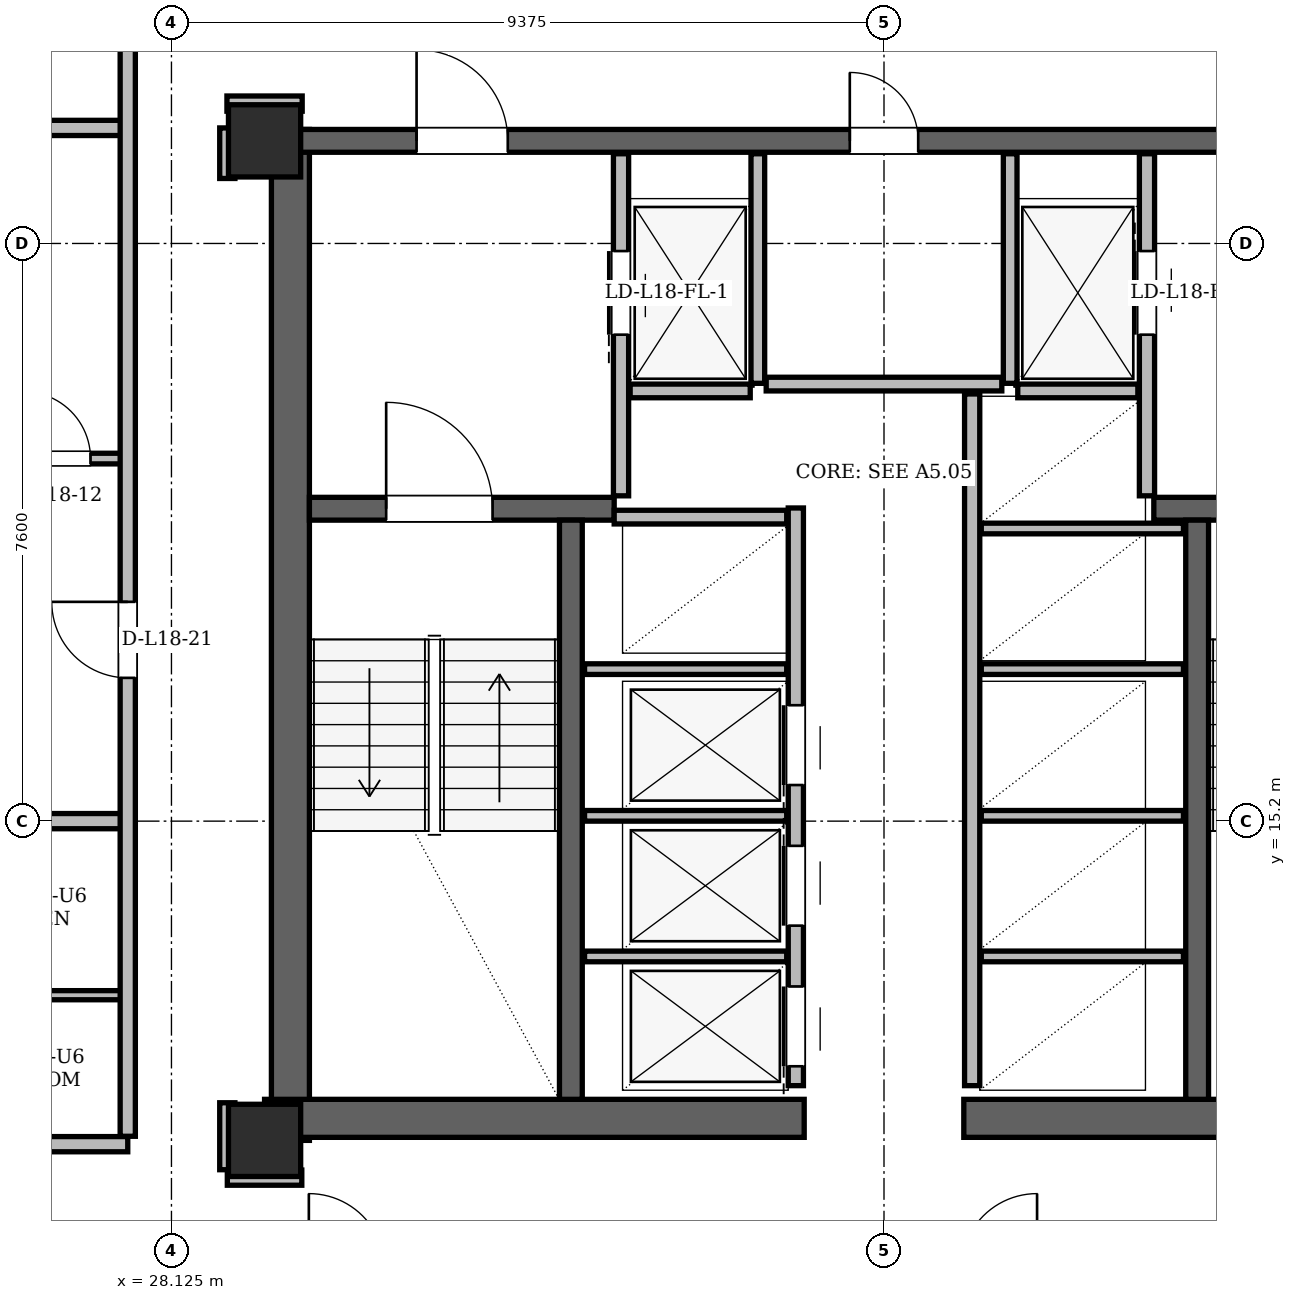
"""IFC4 building model, lengths in metres.
Left out: names, types, materials, properties, quantities, classifications, styles, units other than length and angle.
Written with IfcOpenShell. Run it as: python <this file> out.ifc"""

import sys

from ifc_helpers import new_model, si_unit, direction, frame, frame_2d, origin, origin_2d, place, context, subcontext, project, spatial, rectangle, hollow_rectangle, extrude, element, fill, save


model = new_model("IFC4")
c1 = context("Model", 3, precision=1e-05, world=origin(), true_north=direction((0.0, 1.0)))
c2 = subcontext(c1, "Body", "Model", "MODEL_VIEW")
j1 = project(units=[si_unit("LENGTHUNIT", "METRE"), si_unit("PLANEANGLEUNIT", "RADIAN")], contexts=[c1])
p1 = place(None, origin())
s1 = spatial("IfcSite", under=j1, at=p1, CompositionType="ELEMENT")
p2 = place(p1, origin())
s2 = spatial("IfcBuilding", under=s1, at=p2, CompositionType="ELEMENT")
p3 = place(p2, frame((0.0, 0.0, 70.5)))
s3 = spatial("IfcBuildingStorey", under=s2, at=p3, CompositionType="ELEMENT", Elevation=70.5)
for number, where, z_axis, x_axis in (
    (1, (29.35, 11.0, 0.0), (0.0, 0.0, 1.0), (1.0, 0.0, 0.0)),
    (2, (29.35, 24.15, 0.0), (0.0, 0.0, 1.0), (1.0, 0.0, 0.0)),
):
    element("IfcColumn", number, at=place(p3, frame(where, z_axis=z_axis, x_axis=x_axis)), inside=s3, PredefinedType="COLUMN", context=c2, shape_type="SweptSolid", body=[
        extrude(hollow_rectangle(XDim=0.95, YDim=0.95, WallThickness=0.08, at=origin_2d()), origin(), (0.0, 0.0, 1.0), 3.6),
    ])
p4 = place(p3, frame((29.69, 11.0, 0.0), z_axis=(0.0, 0.0, 1.0), x_axis=(0.0, 1.0, 0.0)))
e3 = element("IfcWall", 3, at=p4, inside=s3, PredefinedType="SHEAR", context=c2, shape_type="SweptSolid", body=[
    extrude(rectangle(XDim=13.3, YDim=0.5, at=frame_2d((6.65, 0.0))), origin(), (0.0, 0.0, 1.0), 3.36),
])
for number, where, z_axis, x_axis in (
    (4, (29.35, 11.29, 0.0), (0.0, 0.0, 1.0), (1.0, 0.0, 0.0)),
    (5, (38.55, 11.29, 0.0), (0.0, 0.0, 1.0), (1.0, 0.0, 0.0)),
):
    element("IfcWall", number, at=place(p3, frame(where, z_axis=z_axis, x_axis=x_axis)), inside=s3, PredefinedType="SHEAR", context=c2, shape_type="SweptSolid", body=[
        extrude(rectangle(XDim=7.1, YDim=0.5, at=frame_2d((3.55, 0.0))), origin(), (0.0, 0.0, 1.0), 3.36),
    ])
p5 = place(p3, frame((29.65, 24.15, 0.0), z_axis=(0.0, 0.0, 1.0), x_axis=(1.0, 0.0, 0.0)))
e6 = element("IfcWall", 6, at=p5, inside=s3, PredefinedType="SHEAR", context=c2, shape_type="SweptSolid", body=[
    extrude(rectangle(XDim=15.7, YDim=0.3, at=frame_2d((7.85, 0.0))), origin(), (0.0, 0.0, 1.0), 3.36),
])
p6 = place(p5, frame((1.7, 0.0, 0.0)))
e7 = element("IfcOpeningElement", 7, at=p6, cuts=e6, PredefinedType="OPENING", context=c2, shape_type="SweptSolid", body=[
    extrude(rectangle(XDim=1.2, YDim=2.2, at=frame_2d((0.6, 1.1))), frame((0.0, 0.15, 0.0), z_axis=(0.0, -1.0, 0.0), x_axis=(1.0, 0.0, 0.0)), (0.0, 0.0, 1.0), 0.3),
])
p7 = place(p5, frame((12.8, 0.0, 0.0)))
e8 = element("IfcOpeningElement", 8, at=p7, cuts=e6, PredefinedType="OPENING", context=c2, shape_type="SweptSolid", body=[
    extrude(rectangle(XDim=1.2, YDim=2.2, at=frame_2d((0.6, 1.1))), frame((0.0, 0.15, 0.0), z_axis=(0.0, -1.0, 0.0), x_axis=(1.0, 0.0, 0.0)), (0.0, 0.0, 1.0), 0.3),
])
p8 = place(p5, frame((7.4, 0.0, 0.0)))
e9 = element("IfcOpeningElement", 9, at=p8, cuts=e6, PredefinedType="OPENING", context=c2, shape_type="SweptSolid", body=[
    extrude(rectangle(XDim=0.9, YDim=2.05, at=frame_2d((0.45, 1.025))), frame((0.0, 0.15, 0.0), z_axis=(0.0, -1.0, 0.0), x_axis=(1.0, 0.0, 0.0)), (0.0, 0.0, 1.0), 0.3),
])
p9 = place(p3, frame((29.94, 19.31, 0.0), z_axis=(0.0, 0.0, 1.0), x_axis=(1.0, 0.0, 0.0)))
e10 = element("IfcWall", 10, at=p9, inside=s3, PredefinedType="SHEAR", context=c2, shape_type="SweptSolid", body=[
    extrude(rectangle(XDim=4.01, YDim=0.3, at=frame_2d((2.005, 0.0))), origin(), (0.0, 0.0, 1.0), 3.36),
])
p10 = place(p9, frame((1.01, 0.0, 0.0)))
e11 = element("IfcOpeningElement", 11, at=p10, cuts=e10, PredefinedType="OPENING", context=c2, shape_type="SweptSolid", body=[
    extrude(rectangle(XDim=1.4, YDim=2.2, at=frame_2d((0.7, 1.1))), frame((0.0, 0.15, 0.0), z_axis=(0.0, -1.0, 0.0), x_axis=(1.0, 0.0, 0.0)), (0.0, 0.0, 1.0), 0.3),
])
p11 = place(p3, frame((41.05, 19.31, 0.0), z_axis=(0.0, 0.0, 1.0), x_axis=(1.0, 0.0, 0.0)))
e12 = element("IfcWall", 12, at=p11, inside=s3, PredefinedType="SHEAR", context=c2, shape_type="SweptSolid", body=[
    extrude(rectangle(XDim=4.01, YDim=0.3, at=frame_2d((2.005, 0.0))), origin(), (0.0, 0.0, 1.0), 3.36),
])
p12 = place(p11, frame((1.6, 0.0, 0.0)))
e13 = element("IfcOpeningElement", 13, at=p12, cuts=e12, PredefinedType="OPENING", context=c2, shape_type="SweptSolid", body=[
    extrude(rectangle(XDim=1.4, YDim=2.2, at=frame_2d((0.7, 1.1))), frame((0.0, 0.15, 0.0), z_axis=(0.0, -1.0, 0.0), x_axis=(1.0, 0.0, 0.0)), (0.0, 0.0, 1.0), 0.3),
])
for number, where, z_axis, x_axis in (
    (14, (33.38, 11.54, 0.0), (0.0, 0.0, 1.0), (0.0, 1.0, 0.0)),
    (15, (41.62, 11.54, 0.0), (0.0, 0.0, 1.0), (0.0, 1.0, 0.0)),
):
    element("IfcWall", number, at=place(p3, frame(where, z_axis=z_axis, x_axis=x_axis)), inside=s3, PredefinedType="SHEAR", context=c2, shape_type="SweptSolid", body=[
        extrude(rectangle(XDim=7.62, YDim=0.3, at=frame_2d((3.81, 0.0))), origin(), (0.0, 0.0, 1.0), 3.36),
    ])
p13 = place(p3, frame((34.04, 19.48, 0.0), z_axis=(0.0, 0.0, 1.0), x_axis=(0.0, 1.0, 0.0)))
e16 = element("IfcWall", 16, at=p13, inside=s3, PredefinedType="PARTITIONING", context=c2, shape_type="SweptSolid", body=[
    extrude(rectangle(XDim=4.5, YDim=0.2, at=frame_2d((2.25, 0.0))), origin(), (0.0, 0.0, 1.0), 2.4),
])
p14 = place(p13, frame((2.12, 0.0, 0.0)))
e17 = element("IfcOpeningElement", 17, at=p14, cuts=e16, PredefinedType="OPENING", context=c2, shape_type="SweptSolid", body=[
    extrude(rectangle(XDim=1.1, YDim=2.2, at=frame_2d((0.55, 1.1))), frame((0.0, 0.1, 0.0), z_axis=(0.0, -1.0, 0.0), x_axis=(1.0, 0.0, 0.0)), (0.0, 0.0, 1.0), 0.2),
])
p15 = place(p3, frame((35.84, 20.96, 0.0), z_axis=(0.0, 0.0, 1.0), x_axis=(0.0, 1.0, 0.0)))
e18 = element("IfcWall", 18, at=p15, inside=s3, PredefinedType="PARTITIONING", context=c2, shape_type="SweptSolid", body=[
    extrude(rectangle(XDim=3.02, YDim=0.18, at=frame_2d((1.51, 0.0))), origin(), (0.0, 0.0, 1.0), 2.4),
])
p16 = place(p3, frame((34.16, 20.86, 0.0), z_axis=(0.0, 0.0, 1.0), x_axis=(1.0, 0.0, 0.0)))
e19 = element("IfcWall", 19, at=p16, inside=s3, PredefinedType="PARTITIONING", context=c2, shape_type="SweptSolid", body=[
    extrude(rectangle(XDim=1.58, YDim=0.18, at=frame_2d((0.79, 0.0))), origin(), (0.0, 0.0, 1.0), 3.36),
])
p17 = place(p3, frame((40.96, 19.48, 0.0), z_axis=(0.0, 0.0, 1.0), x_axis=(0.0, 1.0, 0.0)))
e20 = element("IfcWall", 20, at=p17, inside=s3, PredefinedType="PARTITIONING", context=c2, shape_type="SweptSolid", body=[
    extrude(rectangle(XDim=4.5, YDim=0.2, at=frame_2d((2.25, 0.0))), origin(), (0.0, 0.0, 1.0), 2.4),
])
p18 = place(p17, frame((2.12, 0.0, 0.0)))
e21 = element("IfcOpeningElement", 21, at=p18, cuts=e20, PredefinedType="OPENING", context=c2, shape_type="SweptSolid", body=[
    extrude(rectangle(XDim=1.1, YDim=2.2, at=frame_2d((0.55, 1.1))), frame((0.0, 0.1, 0.0), z_axis=(0.0, -1.0, 0.0), x_axis=(1.0, 0.0, 0.0)), (0.0, 0.0, 1.0), 0.2),
])
p19 = place(p3, frame((39.16, 20.96, 0.0), z_axis=(0.0, 0.0, 1.0), x_axis=(0.0, 1.0, 0.0)))
e22 = element("IfcWall", 22, at=p19, inside=s3, PredefinedType="PARTITIONING", context=c2, shape_type="SweptSolid", body=[
    extrude(rectangle(XDim=3.02, YDim=0.18, at=frame_2d((1.51, 0.0))), origin(), (0.0, 0.0, 1.0), 2.4),
])
p20 = place(p3, frame((39.26, 20.86, 0.0), z_axis=(0.0, 0.0, 1.0), x_axis=(1.0, 0.0, 0.0)))
e23 = element("IfcWall", 23, at=p20, inside=s3, PredefinedType="PARTITIONING", context=c2, shape_type="SweptSolid", body=[
    extrude(rectangle(XDim=1.58, YDim=0.18, at=frame_2d((0.79, 0.0))), origin(), (0.0, 0.0, 1.0), 3.36),
])
p21 = place(p3, frame((36.34, 11.72, 0.0), z_axis=(0.0, 0.0, 1.0), x_axis=(0.0, 1.0, 0.0)))
e24 = element("IfcWall", 24, at=p21, inside=s3, PredefinedType="PARTITIONING", context=c2, shape_type="SweptSolid", body=[
    extrude(rectangle(XDim=7.6, YDim=0.2, at=frame_2d((3.8, 0.0))), origin(), (0.0, 0.0, 1.0), 3.36),
])
p22 = place(p21, frame((0.255, 0.0, 0.0)))
e25 = element("IfcOpeningElement", 25, at=p22, cuts=e24, PredefinedType="OPENING", context=c2, shape_type="SweptSolid", body=[
    extrude(rectangle(XDim=1.05, YDim=2.15, at=frame_2d((0.525, 1.075))), frame((0.0, 0.1, 0.0), z_axis=(0.0, -1.0, 0.0), x_axis=(1.0, 0.0, 0.0)), (0.0, 0.0, 1.0), 0.2),
])
p23 = place(p21, frame((2.105, 0.0, 0.0)))
e26 = element("IfcOpeningElement", 26, at=p23, cuts=e24, PredefinedType="OPENING", context=c2, shape_type="SweptSolid", body=[
    extrude(rectangle(XDim=1.05, YDim=2.15, at=frame_2d((0.525, 1.075))), frame((0.0, 0.1, 0.0), z_axis=(0.0, -1.0, 0.0), x_axis=(1.0, 0.0, 0.0)), (0.0, 0.0, 1.0), 0.2),
])
p24 = place(p21, frame((3.955, 0.0, 0.0)))
e27 = element("IfcOpeningElement", 27, at=p24, cuts=e24, PredefinedType="OPENING", context=c2, shape_type="SweptSolid", body=[
    extrude(rectangle(XDim=1.05, YDim=2.15, at=frame_2d((0.525, 1.075))), frame((0.0, 0.1, 0.0), z_axis=(0.0, -1.0, 0.0), x_axis=(1.0, 0.0, 0.0)), (0.0, 0.0, 1.0), 0.2),
])
p25 = place(p3, frame((33.95, 19.2, 0.0), z_axis=(0.0, 0.0, 1.0), x_axis=(1.0, 0.0, 0.0)))
e28 = element("IfcWall", 28, at=p25, inside=s3, PredefinedType="PARTITIONING", context=c2, shape_type="SweptSolid", body=[
    extrude(rectangle(XDim=2.27, YDim=0.18, at=frame_2d((1.135, 0.0))), origin(), (0.0, 0.0, 1.0), 3.36),
])
for number, where, z_axis, x_axis in (
    (29, (33.56, 13.42, 0.0), (0.0, 0.0, 1.0), (1.0, 0.0, 0.0)),
    (30, (33.56, 15.27, 0.0), (0.0, 0.0, 1.0), (1.0, 0.0, 0.0)),
    (31, (33.56, 17.2, 0.0), (0.0, 0.0, 1.0), (1.0, 0.0, 0.0)),
):
    element("IfcWall", number, at=place(p3, frame(where, z_axis=z_axis, x_axis=x_axis)), inside=s3, PredefinedType="PARTITIONING", context=c2, shape_type="SweptSolid", body=[
        extrude(rectangle(XDim=2.66, YDim=0.14, at=frame_2d((1.33, 0.0))), origin(), (0.0, 0.0, 1.0), 3.36),
    ])
p26 = place(p3, frame((38.66, 11.72, 0.0), z_axis=(0.0, 0.0, 1.0), x_axis=(0.0, 1.0, 0.0)))
e32 = element("IfcWall", 32, at=p26, inside=s3, PredefinedType="PARTITIONING", context=c2, shape_type="SweptSolid", body=[
    extrude(rectangle(XDim=9.1, YDim=0.2, at=frame_2d((4.55, 0.0))), origin(), (0.0, 0.0, 1.0), 3.36),
])
for number, where, z_axis, x_axis in (
    (33, (38.78, 13.42, 0.0), (0.0, 0.0, 1.0), (1.0, 0.0, 0.0)),
    (34, (38.78, 15.27, 0.0), (0.0, 0.0, 1.0), (1.0, 0.0, 0.0)),
    (35, (38.78, 17.2, 0.0), (0.0, 0.0, 1.0), (1.0, 0.0, 0.0)),
    (36, (38.78, 19.05, 0.0), (0.0, 0.0, 1.0), (1.0, 0.0, 0.0)),
):
    element("IfcWall", number, at=place(p3, frame(where, z_axis=z_axis, x_axis=x_axis)), inside=s3, PredefinedType="PARTITIONING", context=c2, shape_type="SweptSolid", body=[
        extrude(rectangle(XDim=2.66, YDim=0.14, at=frame_2d((1.33, 0.0))), origin(), (0.0, 0.0, 1.0), 3.36),
    ])
p27 = place(p3, frame((35.95, 20.95, 0.0), z_axis=(0.0, 0.0, 1.0), x_axis=(1.0, 0.0, 0.0)))
e37 = element("IfcWall", 37, at=p27, inside=s3, PredefinedType="PARTITIONING", context=c2, shape_type="SweptSolid", body=[
    extrude(rectangle(XDim=3.1, YDim=0.18, at=frame_2d((1.55, 0.0))), origin(), (0.0, 0.0, 1.0), 3.36),
])
p28 = place(p3, frame((28.86, 10.51, 0.0), z_axis=(0.0, 0.0, 1.0), x_axis=(1.0, 0.0, 0.0)))
e38 = element("IfcWall", 38, at=p28, inside=s3, PredefinedType="PARTITIONING", context=c2, shape_type="SweptSolid", body=[
    extrude(rectangle(XDim=0.98, YDim=0.2, at=frame_2d((0.49, 0.0))), origin(), (0.0, 0.0, 1.0), 2.738),
])
p29 = place(p3, frame((15.932, 10.95, 0.0), z_axis=(0.0, 0.0, 1.0), x_axis=(1.0, 0.0, 0.0)))
e39 = element("IfcWall", 39, at=p29, inside=s3, PredefinedType="PARTITIONING", context=c2, shape_type="SweptSolid", body=[
    extrude(rectangle(XDim=11.618, YDim=0.2, at=frame_2d((5.809, 0.0))), origin(), (0.0, 0.0, 1.0), 3.36),
])
p30 = place(p29, frame((4.854, 0.0, 0.0)))
e40 = element("IfcOpeningElement", 40, at=p30, cuts=e39, PredefinedType="OPENING", context=c2, shape_type="SweptSolid", body=[
    extrude(rectangle(XDim=1.0, YDim=2.18, at=frame_2d((0.5, 1.09))), frame((0.0, 0.1, 0.0), z_axis=(0.0, -1.0, 0.0), x_axis=(1.0, 0.0, 0.0)), (0.0, 0.0, 1.0), 0.2),
])
p31 = place(p3, frame((23.762, 12.91, 0.0), z_axis=(0.0, 0.0, 1.0), x_axis=(1.0, 0.0, 0.0)))
e41 = element("IfcWall", 41, at=p31, inside=s3, PredefinedType="PARTITIONING", context=c2, shape_type="SweptSolid", body=[
    extrude(rectangle(XDim=3.838, YDim=0.12, at=frame_2d((1.919, 0.0))), origin(), (0.0, 0.0, 1.0), 3.36),
])
p32 = place(p3, frame((14.619, 15.2, 0.0), z_axis=(0.0, 0.0, 1.0), x_axis=(1.0, 0.0, 0.0)))
e42 = element("IfcWall", 42, at=p32, inside=s3, PredefinedType="PARTITIONING", context=c2, shape_type="SweptSolid", body=[
    extrude(rectangle(XDim=12.931, YDim=0.2, at=frame_2d((6.465, 0.0))), origin(), (0.0, 0.0, 1.0), 2.494),
])
p33 = place(p3, frame((17.373, 19.97, 0.0), z_axis=(0.0, 0.0, 1.0), x_axis=(1.0, 0.0, 0.0)))
e43 = element("IfcWall", 43, at=p33, inside=s3, PredefinedType="PARTITIONING", context=c2, shape_type="SweptSolid", body=[
    extrude(rectangle(XDim=10.227, YDim=0.14, at=frame_2d((5.114, 0.0))), origin(), (0.0, 0.0, 1.0), 3.36),
])
p34 = place(p33, frame((2.555, 0.0, 0.0)))
e44 = element("IfcOpeningElement", 44, at=p34, cuts=e43, PredefinedType="OPENING", context=c2, shape_type="SweptSolid", body=[
    extrude(rectangle(XDim=0.92, YDim=2.12, at=frame_2d((0.46, 1.06))), frame((0.0, 0.07, 0.0), z_axis=(0.0, -1.0, 0.0), x_axis=(1.0, 0.0, 0.0)), (0.0, 0.0, 1.0), 0.14),
])
p35 = place(p33, frame((6.712, 0.0, 0.0)))
e45 = element("IfcOpeningElement", 45, at=p35, cuts=e43, PredefinedType="OPENING", context=c2, shape_type="SweptSolid", body=[
    extrude(rectangle(XDim=0.95, YDim=2.1, at=frame_2d((0.475, 1.05))), frame((0.0, 0.07, 0.0), z_axis=(0.0, -1.0, 0.0), x_axis=(1.0, 0.0, 0.0)), (0.0, 0.0, 1.0), 0.14),
])
p36 = place(p33, frame((8.807, 0.0, 0.0)))
e46 = element("IfcOpeningElement", 46, at=p36, cuts=e43, PredefinedType="OPENING", context=c2, shape_type="SweptSolid", body=[
    extrude(rectangle(XDim=0.88, YDim=2.08, at=frame_2d((0.44, 1.04))), frame((0.0, 0.07, 0.0), z_axis=(0.0, -1.0, 0.0), x_axis=(1.0, 0.0, 0.0)), (0.0, 0.0, 1.0), 0.14),
])
p37 = place(p3, frame((19.885, 24.32, 0.0), z_axis=(0.0, 0.0, 1.0), x_axis=(1.0, 0.0, 0.0)))
e47 = element("IfcWall", 47, at=p37, inside=s3, PredefinedType="PARTITIONING", context=c2, shape_type="SweptSolid", body=[
    extrude(rectangle(XDim=7.666, YDim=0.2, at=frame_2d((3.833, 0.0))), origin(), (0.0, 0.0, 1.0), 2.494),
])
p38 = place(p3, frame((28.855, 24.64, 0.0), z_axis=(0.0, 0.0, 1.0), x_axis=(1.0, 0.0, 0.0)))
e48 = element("IfcWall", 48, at=p38, inside=s3, PredefinedType="PARTITIONING", context=c2, shape_type="SweptSolid", body=[
    extrude(rectangle(XDim=0.99, YDim=0.2, at=frame_2d((0.495, 0.0))), origin(), (0.0, 0.0, 1.0), 2.738),
])
p39 = place(p3, frame((27.55, 11.054, 0.0), z_axis=(0.0, 0.0, 1.0), x_axis=(0.0, 1.0, 0.0)))
e49 = element("IfcWall", 49, at=p39, inside=s3, PredefinedType="PARTITIONING", context=c2, shape_type="SweptSolid", body=[
    extrude(rectangle(XDim=14.812, YDim=0.2, at=frame_2d((7.406, 0.0))), origin(), (0.0, 0.0, 1.0), 2.738),
])
p40 = place(p39, frame((6.031, 0.0, 0.0)))
e50 = element("IfcOpeningElement", 50, at=p40, cuts=e49, PredefinedType="OPENING", context=c2, shape_type="SweptSolid", body=[
    extrude(rectangle(XDim=1.0, YDim=2.18, at=frame_2d((0.5, 1.09))), frame((0.0, 0.1, 0.0), z_axis=(0.0, -1.0, 0.0), x_axis=(1.0, 0.0, 0.0)), (0.0, 0.0, 1.0), 0.2),
])
p41 = place(p3, frame((28.86, 10.614, 0.0), z_axis=(0.0, 0.0, 1.0), x_axis=(0.0, 1.0, 0.0)))
e51 = element("IfcWall", 51, at=p41, inside=s3, PredefinedType="PARTITIONING", context=c2, shape_type="SweptSolid", body=[
    extrude(rectangle(XDim=0.881, YDim=0.2, at=frame_2d((0.44, 0.0))), origin(), (0.0, 0.0, 1.0), 2.738),
])
p42 = place(p3, frame((28.86, 23.655, 0.0), z_axis=(0.0, 0.0, 1.0), x_axis=(0.0, 1.0, 0.0)))
e52 = element("IfcWall", 52, at=p42, inside=s3, PredefinedType="PARTITIONING", context=c2, shape_type="SweptSolid", body=[
    extrude(rectangle(XDim=0.665, YDim=0.2, at=frame_2d((0.333, 0.0))), origin(), (0.0, 0.0, 1.0), 2.946),
])
p43 = place(p14, origin())
e53 = element("IfcDoor", 53, at=p43, inside=s3, OperationType="SLIDING_TO_LEFT", PredefinedType="DOOR", context=c2, shape_type="SweptSolid", body=[
    extrude(rectangle(XDim=1.1, YDim=2.2, at=frame_2d((0.55, 1.1))), frame((0.0, 0.025, 0.0), z_axis=(0.0, -1.0, 0.0), x_axis=(1.0, 0.0, 0.0)), (0.0, 0.0, 1.0), 0.05),
])
fill(e17, e53)
p44 = place(p18, origin())
e54 = element("IfcDoor", 54, at=p44, inside=s3, OperationType="SLIDING_TO_RIGHT", PredefinedType="DOOR", context=c2, shape_type="SweptSolid", body=[
    extrude(rectangle(XDim=1.1, YDim=2.2, at=frame_2d((0.55, 1.1))), frame((0.0, 0.025, 0.0), z_axis=(0.0, -1.0, 0.0), x_axis=(1.0, 0.0, 0.0)), (0.0, 0.0, 1.0), 0.05),
])
fill(e21, e54)
p45 = place(p22, origin())
e55 = element("IfcDoor", 55, at=p45, inside=s3, OperationType="SLIDING_TO_LEFT", PredefinedType="DOOR", context=c2, shape_type="SweptSolid", body=[
    extrude(rectangle(XDim=1.05, YDim=2.15, at=frame_2d((0.525, 1.075))), frame((0.0, 0.025, 0.0), z_axis=(0.0, -1.0, 0.0), x_axis=(1.0, 0.0, 0.0)), (0.0, 0.0, 1.0), 0.05),
])
fill(e25, e55)
p46 = place(p23, origin())
e56 = element("IfcDoor", 56, at=p46, inside=s3, OperationType="SLIDING_TO_RIGHT", PredefinedType="DOOR", context=c2, shape_type="SweptSolid", body=[
    extrude(rectangle(XDim=1.05, YDim=2.15, at=frame_2d((0.525, 1.075))), frame((0.0, 0.025, 0.0), z_axis=(0.0, -1.0, 0.0), x_axis=(1.0, 0.0, 0.0)), (0.0, 0.0, 1.0), 0.05),
])
fill(e26, e56)
p47 = place(p24, origin())
e57 = element("IfcDoor", 57, at=p47, inside=s3, OperationType="SLIDING_TO_LEFT", PredefinedType="DOOR", context=c2, shape_type="SweptSolid", body=[
    extrude(rectangle(XDim=1.05, YDim=2.15, at=frame_2d((0.525, 1.075))), frame((0.0, 0.025, 0.0), z_axis=(0.0, -1.0, 0.0), x_axis=(1.0, 0.0, 0.0)), (0.0, 0.0, 1.0), 0.05),
])
fill(e27, e57)
p48 = place(p10, origin())
e58 = element("IfcDoor", 58, at=p48, inside=s3, OperationType="SINGLE_SWING_LEFT", PredefinedType="DOOR", context=c2, shape_type="SweptSolid", body=[
    extrude(rectangle(XDim=1.4, YDim=2.2, at=frame_2d((0.7, 1.1))), frame((0.0, 0.025, 0.0), z_axis=(0.0, -1.0, 0.0), x_axis=(1.0, 0.0, 0.0)), (0.0, 0.0, 1.0), 0.05),
])
fill(e11, e58)
p49 = place(p6, origin())
e59 = element("IfcDoor", 59, at=p49, inside=s3, OperationType="SINGLE_SWING_LEFT", PredefinedType="DOOR", context=c2, shape_type="SweptSolid", body=[
    extrude(rectangle(XDim=1.2, YDim=2.2, at=frame_2d((0.6, 1.1))), frame((0.0, 0.025, 0.0), z_axis=(0.0, -1.0, 0.0), x_axis=(1.0, 0.0, 0.0)), (0.0, 0.0, 1.0), 0.05),
])
fill(e7, e59)
p50 = place(p8, origin())
e60 = element("IfcDoor", 60, at=p50, inside=s3, OperationType="SINGLE_SWING_LEFT", PredefinedType="DOOR", context=c2, shape_type="SweptSolid", body=[
    extrude(rectangle(XDim=0.9, YDim=2.05, at=frame_2d((0.45, 1.025))), frame((0.0, 0.025, 0.0), z_axis=(0.0, -1.0, 0.0), x_axis=(1.0, 0.0, 0.0)), (0.0, 0.0, 1.0), 0.05),
])
fill(e9, e60)
p51 = place(p36, origin())
e61 = element("IfcDoor", 61, at=p51, inside=s3, OperationType="SINGLE_SWING_LEFT", PredefinedType="DOOR", context=c2, shape_type="SweptSolid", body=[
    extrude(rectangle(XDim=0.88, YDim=2.08, at=frame_2d((0.44, 1.04))), frame((0.0, 0.025, 0.0), z_axis=(0.0, -1.0, 0.0), x_axis=(1.0, 0.0, 0.0)), (0.0, 0.0, 1.0), 0.05),
])
fill(e46, e61)
p52 = place(p40, origin())
e62 = element("IfcDoor", 62, at=p52, inside=s3, OperationType="SINGLE_SWING_RIGHT", PredefinedType="DOOR", context=c2, shape_type="SweptSolid", body=[
    extrude(rectangle(XDim=1.0, YDim=2.18, at=frame_2d((0.5, 1.09))), frame((0.0, 0.025, 0.0), z_axis=(0.0, -1.0, 0.0), x_axis=(1.0, 0.0, 0.0)), (0.0, 0.0, 1.0), 0.05),
])
fill(e50, e62)
save(model, sys.argv[1])
